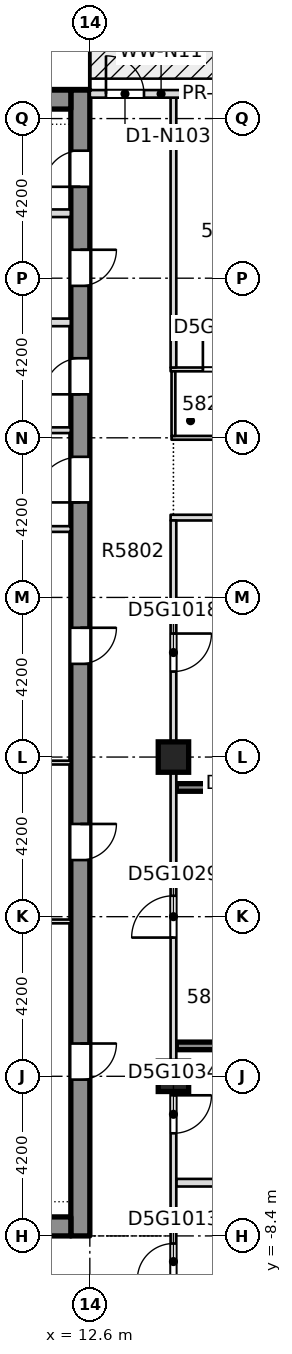
"""IFC4 building model, lengths in metres.
Left out: names, types, materials, properties, quantities, classifications, styles, units other than length and angle.
Written with IfcOpenShell. Run it as: python <this file> out.ifc"""

import sys

from ifc_helpers import new_model, si_unit, direction, frame, frame_2d, origin, origin_2d, place, context, subcontext, project, spatial, rectangle, extrude, element, fill, save


model = new_model("IFC4")
c1 = context("Model", 3, precision=1e-05, world=origin(), true_north=direction((0.0, 1.0)))
c2 = subcontext(c1, "Body", "Model", "MODEL_VIEW")
j1 = project(units=[si_unit("LENGTHUNIT", "METRE"), si_unit("PLANEANGLEUNIT", "RADIAN")], contexts=[c1])
p1 = place(None, origin())
s1 = spatial("IfcSite", under=j1, at=p1, CompositionType="ELEMENT")
p2 = place(p1, origin())
s2 = spatial("IfcBuilding", under=s1, at=p2, CompositionType="ELEMENT")
p3 = place(p2, frame((0.0, 0.0, 223.45)))
s3 = spatial("IfcBuildingStorey", under=s2, at=p3, CompositionType="ELEMENT", Elevation=223.45)
p4 = place(p3, frame((12.35, -8.4, -0.4), z_axis=(0.0, 0.0, 1.0), x_axis=(0.0, 1.0, 0.0)))
e1 = element("IfcWall", 1, at=p4, inside=s3, PredefinedType="SHEAR", context=c2, shape_type="SweptSolid", body=[
    extrude(rectangle(XDim=30.15, YDim=0.5, at=frame_2d((15.075, 0.0))), origin(), (0.0, 0.0, 1.0), 3.45),
])
p5 = place(p4, frame((4.113, 0.0, 0.4)))
e2 = element("IfcOpeningElement", 2, at=p5, cuts=e1, PredefinedType="OPENING", context=c2, shape_type="SweptSolid", body=[
    extrude(rectangle(XDim=0.95, YDim=2.1, at=frame_2d((0.475, 1.05))), frame((0.0, 0.26, 0.0), z_axis=(0.0, -1.0, 0.0), x_axis=(1.0, 0.0, 0.0)), (0.0, 0.0, 1.0), 0.52),
])
p6 = place(p4, frame((9.89, 0.0, 0.4)))
e3 = element("IfcOpeningElement", 3, at=p6, cuts=e1, PredefinedType="OPENING", context=c2, shape_type="SweptSolid", body=[
    extrude(rectangle(XDim=0.95, YDim=2.1, at=frame_2d((0.475, 1.05))), frame((0.0, 0.26, 0.0), z_axis=(0.0, -1.0, 0.0), x_axis=(1.0, 0.0, 0.0)), (0.0, 0.0, 1.0), 0.52),
])
p7 = place(p4, frame((15.052, 0.0, 0.4)))
e4 = element("IfcOpeningElement", 4, at=p7, cuts=e1, PredefinedType="OPENING", context=c2, shape_type="SweptSolid", body=[
    extrude(rectangle(XDim=0.95, YDim=2.1, at=frame_2d((0.475, 1.05))), frame((0.0, 0.26, 0.0), z_axis=(0.0, -1.0, 0.0), x_axis=(1.0, 0.0, 0.0)), (0.0, 0.0, 1.0), 0.52),
])
p8 = place(p4, frame((22.144, 0.0, 0.4)))
e5 = element("IfcOpeningElement", 5, at=p8, cuts=e1, PredefinedType="OPENING", context=c2, shape_type="SweptSolid", body=[
    extrude(rectangle(XDim=0.95, YDim=2.1, at=frame_2d((0.475, 1.05))), frame((0.0, 0.26, 0.0), z_axis=(0.0, -1.0, 0.0), x_axis=(1.0, 0.0, 0.0)), (0.0, 0.0, 1.0), 0.52),
])
p9 = place(p4, frame((24.998, 0.0, 0.4)))
e6 = element("IfcOpeningElement", 6, at=p9, cuts=e1, PredefinedType="OPENING", context=c2, shape_type="SweptSolid", body=[
    extrude(rectangle(XDim=0.95, YDim=2.1, at=frame_2d((0.475, 1.05))), frame((0.0, 0.26, 0.0), z_axis=(0.0, -1.0, 0.0), x_axis=(1.0, 0.0, 0.0)), (0.0, 0.0, 1.0), 0.52),
])
p10 = place(p4, frame((27.605, 0.0, 0.4)))
e7 = element("IfcOpeningElement", 7, at=p10, cuts=e1, PredefinedType="OPENING", context=c2, shape_type="SweptSolid", body=[
    extrude(rectangle(XDim=0.95, YDim=2.1, at=frame_2d((0.475, 1.05))), frame((0.0, 0.26, 0.0), z_axis=(0.0, -1.0, 0.0), x_axis=(1.0, 0.0, 0.0)), (0.0, 0.0, 1.0), 0.52),
])
p11 = place(p4, frame((19.3, 0.0, 0.4)))
e8 = element("IfcOpeningElement", 8, at=p11, cuts=e1, PredefinedType="OPENING", context=c2, shape_type="SweptSolid", body=[
    extrude(rectangle(XDim=1.2, YDim=2.1, at=frame_2d((0.6, 1.05))), frame((0.0, 0.26, 0.0), z_axis=(0.0, -1.0, 0.0), x_axis=(1.0, 0.0, 0.0)), (0.0, 0.0, 1.0), 0.52),
])
p12 = place(p3, frame((-12.1, -8.15, -0.4), z_axis=(0.0, 0.0, 1.0), x_axis=(1.0, 0.0, 0.0)))
e9 = element("IfcWall", 9, at=p12, inside=s3, PredefinedType="SHEAR", context=c2, shape_type="SweptSolid", body=[
    extrude(rectangle(XDim=24.2, YDim=0.5, at=frame_2d((12.1, 0.0))), origin(), (0.0, 0.0, 1.0), 3.45),
])
p13 = place(p12, frame((7.35, 0.0, 0.4)))
e10 = element("IfcOpeningElement", 10, at=p13, cuts=e9, PredefinedType="OPENING", context=c2, shape_type="SweptSolid", body=[
    extrude(rectangle(XDim=1.8, YDim=2.1, at=frame_2d((0.9, 1.05))), frame((0.0, 0.26, 0.0), z_axis=(0.0, -1.0, 0.0), x_axis=(1.0, 0.0, 0.0)), (0.0, 0.0, 1.0), 0.52),
])
p14 = place(p12, frame((15.05, 0.0, 0.4)))
e11 = element("IfcOpeningElement", 11, at=p14, cuts=e9, PredefinedType="OPENING", context=c2, shape_type="SweptSolid", body=[
    extrude(rectangle(XDim=1.8, YDim=2.1, at=frame_2d((0.9, 1.05))), frame((0.0, 0.26, 0.0), z_axis=(0.0, -1.0, 0.0), x_axis=(1.0, 0.0, 0.0)), (0.0, 0.0, 1.0), 0.52),
])
p15 = place(p3, frame((-12.1, 21.5, -0.4), z_axis=(0.0, 0.0, 1.0), x_axis=(1.0, 0.0, 0.0)))
e12 = element("IfcWall", 12, at=p15, inside=s3, PredefinedType="SHEAR", context=c2, shape_type="SweptSolid", body=[
    extrude(rectangle(XDim=24.2, YDim=0.5, at=frame_2d((12.1, 0.0))), origin(), (0.0, 0.0, 1.0), 3.45),
])
for number, where, z_axis, x_axis in (
    (13, (14.8, -4.2, -0.4), (0.0, 0.0, 1.0), (1.0, 0.0, 0.0)),
    (14, (14.8, 4.2, -0.4), (0.0, 0.0, 1.0), (1.0, 0.0, 0.0)),
):
    element("IfcColumn", number, at=place(p3, frame(where, z_axis=z_axis, x_axis=x_axis)), inside=s3, PredefinedType="COLUMN", context=c2, shape_type="SweptSolid", body=[
        extrude(rectangle(XDim=0.8, YDim=0.8, at=origin_2d()), origin(), (0.0, 0.0, 1.0), 3.45),
    ])
p16 = place(p3, frame((14.875, -7.0, 0.0), z_axis=(0.0, 0.0, 1.0), x_axis=(1.0, 0.0, 0.0)))
e15 = element("IfcWall", 15, at=p16, inside=s3, PredefinedType="PARTITIONING", context=c2, shape_type="SweptSolid", body=[
    extrude(rectangle(XDim=10.875, YDim=0.2, at=frame_2d((5.438, 0.0))), origin(), (0.0, 0.0, 1.0), 3.05),
])
p17 = place(p3, frame((14.875, -3.4, 0.0), z_axis=(0.0, 0.0, 1.0), x_axis=(1.0, 0.0, 0.0)))
e16 = element("IfcWall", 16, at=p17, inside=s3, PredefinedType="SOLIDWALL", context=c2, shape_type="SweptSolid", body=[
    extrude(rectangle(XDim=5.525, YDim=0.2, at=frame_2d((2.762, 0.0))), origin(), (0.0, 0.0, 1.0), 3.05),
])
p18 = place(p3, frame((14.875, 3.4, 0.0), z_axis=(0.0, 0.0, 1.0), x_axis=(1.0, 0.0, 0.0)))
e17 = element("IfcWall", 17, at=p18, inside=s3, PredefinedType="SOLIDWALL", context=c2, shape_type="SweptSolid", body=[
    extrude(rectangle(XDim=5.575, YDim=0.2, at=frame_2d((2.788, 0.0))), origin(), (0.0, 0.0, 1.0), 3.05),
])
p19 = place(p3, frame((14.725, 10.5, 0.0), z_axis=(0.0, 0.0, 1.0), x_axis=(1.0, 0.0, 0.0)))
e18 = element("IfcWall", 18, at=p19, inside=s3, PredefinedType="PARTITIONING", context=c2, shape_type="SweptSolid", body=[
    extrude(rectangle(XDim=11.025, YDim=0.15, at=frame_2d((5.512, 0.0))), origin(), (0.0, 0.0, 1.0), 3.05),
])
p20 = place(p3, frame((14.75, 12.6, 0.0), z_axis=(0.0, 0.0, 1.0), x_axis=(1.0, 0.0, 0.0)))
e19 = element("IfcWall", 19, at=p20, inside=s3, PredefinedType="PARTITIONING", context=c2, shape_type="SweptSolid", body=[
    extrude(rectangle(XDim=2.5, YDim=0.1, at=frame_2d((1.25, 0.0))), origin(), (0.0, 0.0, 1.0), 3.05),
])
p21 = place(p3, frame((14.725, 14.4, 0.0), z_axis=(0.0, 0.0, 1.0), x_axis=(1.0, 0.0, 0.0)))
e20 = element("IfcWall", 20, at=p21, inside=s3, PredefinedType="PARTITIONING", context=c2, shape_type="SweptSolid", body=[
    extrude(rectangle(XDim=2.525, YDim=0.1, at=frame_2d((1.262, 0.0))), origin(), (0.0, 0.0, 1.0), 3.05),
])
p22 = place(p21, frame((0.85, 0.0, 0.0)))
e21 = element("IfcOpeningElement", 21, at=p22, cuts=e20, PredefinedType="OPENING", context=c2, shape_type="SweptSolid", body=[
    extrude(rectangle(XDim=0.85, YDim=2.1, at=frame_2d((0.425, 1.05))), frame((0.0, 0.06, 0.0), z_axis=(0.0, -1.0, 0.0), x_axis=(1.0, 0.0, 0.0)), (0.0, 0.0, 1.0), 0.12),
])
p23 = place(p3, frame((14.8, -10.55, 0.0), z_axis=(0.0, 0.0, 1.0), x_axis=(0.0, 1.0, 0.0)))
e22 = element("IfcWall", 22, at=p23, inside=s3, PredefinedType="PARTITIONING", context=c2, shape_type="SweptSolid", body=[
    extrude(rectangle(XDim=20.975, YDim=0.15, at=frame_2d((10.488, 0.0))), origin(), (0.0, 0.0, 1.0), 3.05),
])
p24 = place(p23, frame((1.0, 0.0, 0.0)))
e23 = element("IfcOpeningElement", 23, at=p24, cuts=e22, PredefinedType="OPENING", context=c2, shape_type="SweptSolid", body=[
    extrude(rectangle(XDim=0.95, YDim=2.1, at=frame_2d((0.475, 1.05))), frame((0.0, 0.085, 0.0), z_axis=(0.0, -1.0, 0.0), x_axis=(1.0, 0.0, 0.0)), (0.0, 0.0, 1.0), 0.17),
])
p25 = place(p23, frame((17.0, 0.0, 0.0)))
e24 = element("IfcOpeningElement", 24, at=p25, cuts=e22, PredefinedType="OPENING", context=c2, shape_type="SweptSolid", body=[
    extrude(rectangle(XDim=1.0, YDim=2.1, at=frame_2d((0.5, 1.05))), frame((0.0, 0.085, 0.0), z_axis=(0.0, -1.0, 0.0), x_axis=(1.0, 0.0, 0.0)), (0.0, 0.0, 1.0), 0.17),
])
p26 = place(p23, frame((10.0, 0.0, 0.0)))
e25 = element("IfcOpeningElement", 25, at=p26, cuts=e22, PredefinedType="OPENING", context=c2, shape_type="SweptSolid", body=[
    extrude(rectangle(XDim=1.1, YDim=2.1, at=frame_2d((0.55, 1.05))), frame((0.0, 0.085, 0.0), z_axis=(0.0, -1.0, 0.0), x_axis=(1.0, 0.0, 0.0)), (0.0, 0.0, 1.0), 0.17),
])
p27 = place(p23, frame((4.85, 0.0, 0.0)))
e26 = element("IfcOpeningElement", 26, at=p27, cuts=e22, PredefinedType="OPENING", context=c2, shape_type="SweptSolid", body=[
    extrude(rectangle(XDim=1.0, YDim=2.1, at=frame_2d((0.5, 1.05))), frame((0.0, 0.085, 0.0), z_axis=(0.0, -1.0, 0.0), x_axis=(1.0, 0.0, 0.0)), (0.0, 0.0, 1.0), 0.17),
])
p28 = place(p3, frame((14.8, 12.65, 0.0), z_axis=(0.0, 0.0, 1.0), x_axis=(0.0, 1.0, 0.0)))
e27 = element("IfcWall", 27, at=p28, inside=s3, PredefinedType="PARTITIONING", context=c2, shape_type="SweptSolid", body=[
    extrude(rectangle(XDim=1.7, YDim=0.1, at=frame_2d((0.85, 0.0))), origin(), (0.0, 0.0, 1.0), 3.05),
])
p29 = place(p3, frame((14.8, 14.45, 0.0), z_axis=(0.0, 0.0, 1.0), x_axis=(0.0, 1.0, 0.0)))
e28 = element("IfcWall", 28, at=p29, inside=s3, PredefinedType="PARTITIONING", context=c2, shape_type="SweptSolid", body=[
    extrude(rectangle(XDim=7.1, YDim=0.15, at=frame_2d((3.55, 0.0))), origin(), (0.0, 0.0, 1.0), 3.05),
])
p30 = place(p3, frame((16.35, 21.65, 0.0), z_axis=(0.0, 0.0, 1.0), x_axis=(-1.0, 0.0, 0.0)))
e29 = element("IfcWall", 29, at=p30, inside=s3, PredefinedType="STANDARD", context=c2, shape_type="SweptSolid", body=[
    extrude(rectangle(XDim=3.75, YDim=0.2, at=frame_2d((1.875, 0.0))), origin(), (0.0, 0.0, 1.0), 3.05),
])
p31 = place(p30, frame((2.325, 0.0, 0.0)))
e30 = element("IfcOpeningElement", 30, at=p31, cuts=e29, PredefinedType="OPENING", context=c2, shape_type="SweptSolid", body=[
    extrude(rectangle(XDim=1.0, YDim=2.4, at=frame_2d((0.5, 1.2))), frame((0.0, 0.11, 0.0), z_axis=(0.0, -1.0, 0.0), x_axis=(1.0, 0.0, 0.0)), (0.0, 0.0, 1.0), 0.22),
])
for number, where, z_axis, x_axis in (
    (31, (8.651, -0.125, 0.0), (0.0, 0.0, 1.0), (1.0, 0.0, 0.0)),
    (32, (8.651, 4.054, 0.0), (0.0, 0.0, 1.0), (1.0, 0.0, 0.0)),
):
    element("IfcWall", number, at=place(p3, frame(where, z_axis=z_axis, x_axis=x_axis)), inside=s3, PredefinedType="PARTITIONING", context=c2, shape_type="SweptSolid", body=[
        extrude(rectangle(XDim=3.448, YDim=0.1, at=frame_2d((1.724, 0.0))), origin(), (0.0, 0.0, 1.0), 3.05),
    ])
for number, where, z_axis, x_axis in (
    (33, (8.651, 10.2, 0.0), (0.0, 0.0, 1.0), (1.0, 0.0, 0.0)),
    (34, (8.651, 12.8, 0.0), (0.0, 0.0, 1.0), (1.0, 0.0, 0.0)),
):
    element("IfcWall", number, at=place(p3, frame(where, z_axis=z_axis, x_axis=x_axis)), inside=s3, PredefinedType="PARTITIONING", context=c2, shape_type="SweptSolid", body=[
        extrude(rectangle(XDim=3.448, YDim=0.15, at=frame_2d((1.724, 0.0))), origin(), (0.0, 0.0, 1.0), 3.05),
    ])
for number, where, z_axis, x_axis in (
    (35, (8.651, 15.637, 0.0), (0.0, 0.0, 1.0), (1.0, 0.0, 0.0)),
    (36, (8.651, 18.509, 0.0), (0.0, 0.0, 1.0), (1.0, 0.0, 0.0)),
):
    element("IfcWall", number, at=place(p3, frame(where, z_axis=z_axis, x_axis=x_axis)), inside=s3, PredefinedType="PARTITIONING", context=c2, shape_type="SweptSolid", body=[
        extrude(rectangle(XDim=3.448, YDim=0.2, at=frame_2d((1.724, 0.0))), origin(), (0.0, 0.0, 1.0), 3.05),
    ])
p32 = place(p24, origin())
e37 = element("IfcDoor", 37, at=p32, inside=s3, OperationType="SINGLE_SWING_RIGHT", PredefinedType="DOOR", context=c2, shape_type="SweptSolid", body=[
    extrude(rectangle(XDim=0.95, YDim=2.1, at=frame_2d((0.475, 1.05))), frame((0.0, 0.025, 0.0), z_axis=(0.0, -1.0, 0.0), x_axis=(1.0, 0.0, 0.0)), (0.0, 0.0, 1.0), 0.05),
])
fill(e23, e37)
p33 = place(p25, origin())
e38 = element("IfcDoor", 38, at=p33, inside=s3, OperationType="SINGLE_SWING_RIGHT", PredefinedType="DOOR", context=c2, shape_type="SweptSolid", body=[
    extrude(rectangle(XDim=1.0, YDim=2.1, at=frame_2d((0.5, 1.05))), frame((0.0, 0.025, 0.0), z_axis=(0.0, -1.0, 0.0), x_axis=(1.0, 0.0, 0.0)), (0.0, 0.0, 1.0), 0.05),
])
fill(e24, e38)
p34 = place(p22, origin())
e39 = element("IfcDoor", 39, at=p34, inside=s3, OperationType="SINGLE_SWING_RIGHT", PredefinedType="DOOR", context=c2, shape_type="SweptSolid", body=[
    extrude(rectangle(XDim=0.85, YDim=2.1, at=frame_2d((0.425, 1.05))), frame((0.0, 0.025, 0.0), z_axis=(0.0, -1.0, 0.0), x_axis=(1.0, 0.0, 0.0)), (0.0, 0.0, 1.0), 0.05),
])
fill(e21, e39)
p35 = place(p26, origin())
e40 = element("IfcDoor", 40, at=p35, inside=s3, OperationType="SINGLE_SWING_LEFT", PredefinedType="DOOR", context=c2, shape_type="SweptSolid", body=[
    extrude(rectangle(XDim=1.1, YDim=2.1, at=frame_2d((0.55, 1.05))), frame((0.0, 0.025, 0.0), z_axis=(0.0, -1.0, 0.0), x_axis=(1.0, 0.0, 0.0)), (0.0, 0.0, 1.0), 0.05),
])
fill(e25, e40)
p36 = place(p27, origin())
e41 = element("IfcDoor", 41, at=p36, inside=s3, OperationType="SINGLE_SWING_LEFT", PredefinedType="DOOR", context=c2, shape_type="SweptSolid", body=[
    extrude(rectangle(XDim=1.0, YDim=2.1, at=frame_2d((0.5, 1.05))), frame((0.0, 0.025, 0.0), z_axis=(0.0, -1.0, 0.0), x_axis=(1.0, 0.0, 0.0)), (0.0, 0.0, 1.0), 0.05),
])
fill(e26, e41)
p37 = place(p31, origin())
e42 = element("IfcDoor", 42, at=p37, inside=s3, OperationType="SINGLE_SWING_LEFT", PredefinedType="DOOR", context=c2, shape_type="SweptSolid", body=[
    extrude(rectangle(XDim=1.0, YDim=2.4, at=frame_2d((0.5, 1.2))), frame((0.0, 0.025, 0.0), z_axis=(0.0, -1.0, 0.0), x_axis=(1.0, 0.0, 0.0)), (0.0, 0.0, 1.0), 0.05),
])
fill(e30, e42)
p38 = place(p5, origin())
e43 = element("IfcDoor", 43, at=p38, inside=s3, OperationType="SINGLE_SWING_LEFT", PredefinedType="DOOR", context=c2, shape_type="SweptSolid", body=[
    extrude(rectangle(XDim=0.95, YDim=2.1, at=frame_2d((0.475, 1.05))), frame((0.0, 0.025, 0.0), z_axis=(0.0, -1.0, 0.0), x_axis=(1.0, 0.0, 0.0)), (0.0, 0.0, 1.0), 0.05),
])
fill(e2, e43)
p39 = place(p6, origin())
e44 = element("IfcDoor", 44, at=p39, inside=s3, OperationType="SINGLE_SWING_LEFT", PredefinedType="DOOR", context=c2, shape_type="SweptSolid", body=[
    extrude(rectangle(XDim=0.95, YDim=2.1, at=frame_2d((0.475, 1.05))), frame((0.0, 0.025, 0.0), z_axis=(0.0, -1.0, 0.0), x_axis=(1.0, 0.0, 0.0)), (0.0, 0.0, 1.0), 0.05),
])
fill(e3, e44)
p40 = place(p7, origin())
e45 = element("IfcDoor", 45, at=p40, inside=s3, OperationType="SINGLE_SWING_LEFT", PredefinedType="DOOR", context=c2, shape_type="SweptSolid", body=[
    extrude(rectangle(XDim=0.95, YDim=2.1, at=frame_2d((0.475, 1.05))), frame((0.0, 0.025, 0.0), z_axis=(0.0, -1.0, 0.0), x_axis=(1.0, 0.0, 0.0)), (0.0, 0.0, 1.0), 0.05),
])
fill(e4, e45)
p41 = place(p8, origin())
e46 = element("IfcDoor", 46, at=p41, inside=s3, OperationType="SINGLE_SWING_LEFT", PredefinedType="DOOR", context=c2, shape_type="SweptSolid", body=[
    extrude(rectangle(XDim=0.95, YDim=2.1, at=frame_2d((0.475, 1.05))), frame((0.0, 0.025, 0.0), z_axis=(0.0, -1.0, 0.0), x_axis=(1.0, 0.0, 0.0)), (0.0, 0.0, 1.0), 0.05),
])
fill(e5, e46)
p42 = place(p9, origin())
e47 = element("IfcDoor", 47, at=p42, inside=s3, OperationType="SINGLE_SWING_LEFT", PredefinedType="DOOR", context=c2, shape_type="SweptSolid", body=[
    extrude(rectangle(XDim=0.95, YDim=2.1, at=frame_2d((0.475, 1.05))), frame((0.0, 0.025, 0.0), z_axis=(0.0, -1.0, 0.0), x_axis=(1.0, 0.0, 0.0)), (0.0, 0.0, 1.0), 0.05),
])
fill(e6, e47)
p43 = place(p10, origin())
e48 = element("IfcDoor", 48, at=p43, inside=s3, OperationType="SINGLE_SWING_LEFT", PredefinedType="DOOR", context=c2, shape_type="SweptSolid", body=[
    extrude(rectangle(XDim=0.95, YDim=2.1, at=frame_2d((0.475, 1.05))), frame((0.0, 0.025, 0.0), z_axis=(0.0, -1.0, 0.0), x_axis=(1.0, 0.0, 0.0)), (0.0, 0.0, 1.0), 0.05),
])
fill(e7, e48)
p44 = place(p11, origin())
e49 = element("IfcDoor", 49, at=p44, inside=s3, OperationType="SINGLE_SWING_LEFT", PredefinedType="DOOR", context=c2, shape_type="SweptSolid", body=[
    extrude(rectangle(XDim=1.2, YDim=2.1, at=frame_2d((0.6, 1.05))), frame((0.0, 0.025, 0.0), z_axis=(0.0, -1.0, 0.0), x_axis=(1.0, 0.0, 0.0)), (0.0, 0.0, 1.0), 0.05),
])
fill(e8, e49)
save(model, sys.argv[1])
